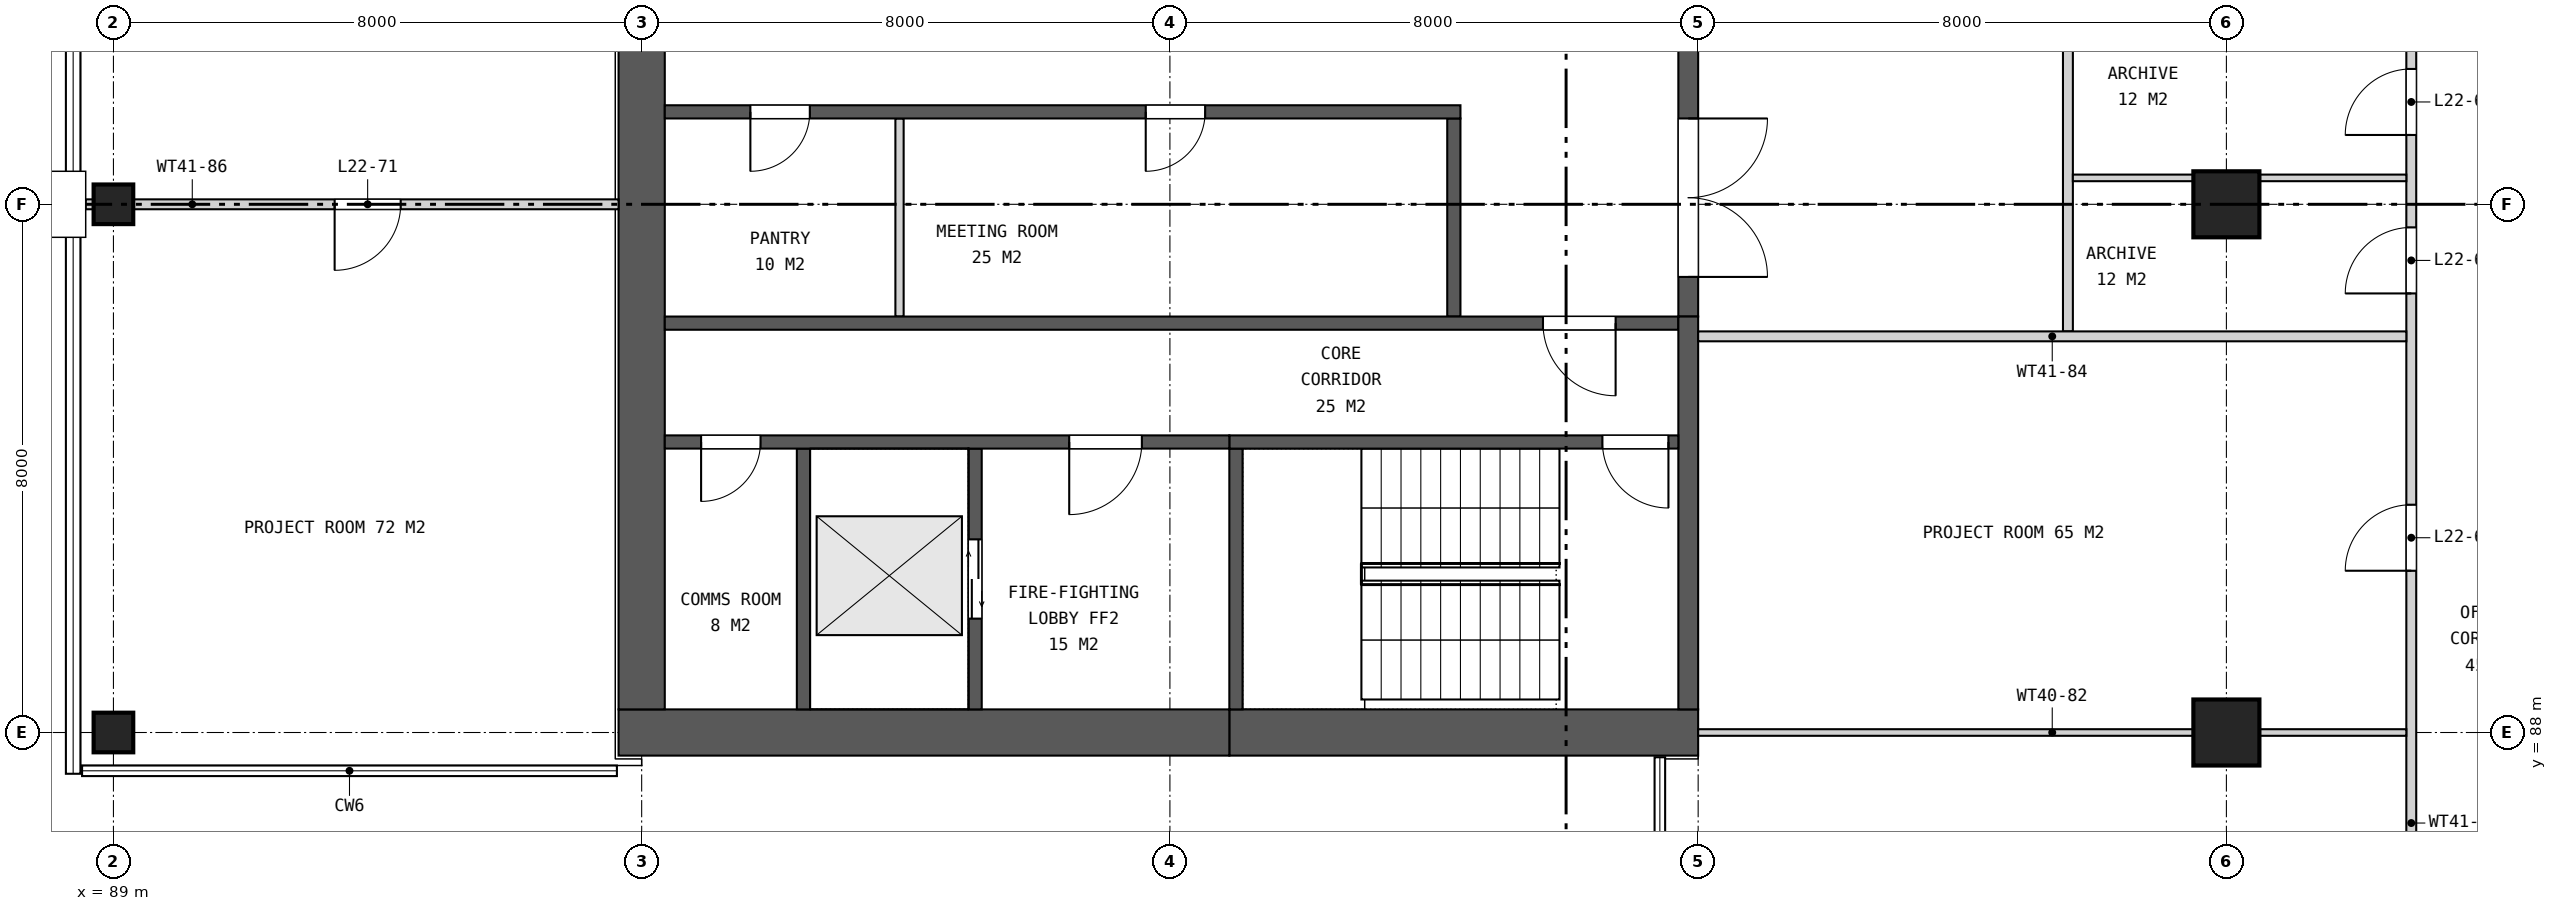
"""IFC4 building model, lengths in metres.
Left out: names, types, materials, properties, quantities, classifications, styles, units other than length and angle.
Written with IfcOpenShell. Run it as: python <this file> out.ifc"""

import sys

from ifc_helpers import new_model, si_unit, direction, frame, frame_2d, origin, origin_2d, place, context, subcontext, project, spatial, rectangle, extrude, element, fill, save


model = new_model("IFC4")
c1 = context("Model", 3, precision=1e-05, world=origin(), true_north=direction((0.0, 1.0)))
c2 = subcontext(c1, "Body", "Model", "MODEL_VIEW")
j1 = project(units=[si_unit("LENGTHUNIT", "METRE"), si_unit("PLANEANGLEUNIT", "RADIAN")], contexts=[c1])
p1 = place(None, origin())
s1 = spatial("IfcSite", under=j1, at=p1, CompositionType="ELEMENT")
p2 = place(p1, origin())
s2 = spatial("IfcBuilding", under=s1, at=p2, CompositionType="ELEMENT")
p3 = place(p2, frame((0.0, 0.0, 112.7)))
s3 = spatial("IfcBuildingStorey", under=s2, at=p3, CompositionType="ELEMENT", Elevation=112.7)
for number, where, z_axis, x_axis in (
    (1, (89.0, 88.0, 0.0), (0.0, 0.0, 1.0), (1.0, 0.0, 0.0)),
    (2, (89.0, 96.0, 0.0), (0.0, 0.0, 1.0), (1.0, 0.0, 0.0)),
):
    element("IfcColumn", number, at=place(p3, frame(where, z_axis=z_axis, x_axis=x_axis)), inside=s3, PredefinedType="COLUMN", context=c2, shape_type="SweptSolid", body=[
        extrude(rectangle(XDim=0.6, YDim=0.6, at=origin_2d()), origin(), (0.0, 0.0, 1.0), 4.2),
    ])
for number, where, z_axis, x_axis in (
    (3, (121.0, 88.0, 0.0), (0.0, 0.0, 1.0), (1.0, 0.0, 0.0)),
    (4, (121.0, 96.0, 0.0), (0.0, 0.0, 1.0), (1.0, 0.0, 0.0)),
):
    element("IfcColumn", number, at=place(p3, frame(where, z_axis=z_axis, x_axis=x_axis)), inside=s3, PredefinedType="COLUMN", context=c2, shape_type="SweptSolid", body=[
        extrude(rectangle(XDim=1.0, YDim=1.0, at=origin_2d()), origin(), (0.0, 0.0, 1.0), 4.2),
    ])
p4 = place(p3, frame((113.0, 88.0, 0.0), z_axis=(0.0, 0.0, 1.0), x_axis=(-1.0, 0.0, 0.0)))
e5 = element("IfcWall", 5, at=p4, inside=s3, PredefinedType="SHEAR", context=c2, shape_type="SweptSolid", body=[
    extrude(rectangle(XDim=7.1, YDim=0.7, at=frame_2d((3.55, 0.0))), origin(), (0.0, 0.0, 1.0), 4.2),
])
p5 = place(p3, frame((105.9, 88.0, 0.0), z_axis=(0.0, 0.0, 1.0), x_axis=(-1.0, 0.0, 0.0)))
e6 = element("IfcWall", 6, at=p5, inside=s3, PredefinedType="SHEAR", context=c2, shape_type="SweptSolid", body=[
    extrude(rectangle(XDim=9.25, YDim=0.7, at=frame_2d((4.625, 0.0))), origin(), (0.0, 0.0, 1.0), 4.2),
])
p6 = place(p3, frame((97.0, 111.65, 0.0), z_axis=(0.0, 0.0, 1.0), x_axis=(0.0, -1.0, 0.0)))
e7 = element("IfcWall", 7, at=p6, inside=s3, PredefinedType="SHEAR", context=c2, shape_type="SweptSolid", body=[
    extrude(rectangle(XDim=23.3, YDim=0.7, at=frame_2d((11.65, 0.0))), origin(), (0.0, 0.0, 1.0), 4.2),
])
p7 = place(p6, frame((10.45, 0.0, 0.0)))
e8 = element("IfcOpeningElement", 8, at=p7, cuts=e7, PredefinedType="OPENING", context=c2, shape_type="SweptSolid", body=[
    extrude(rectangle(XDim=2.4, YDim=2.4, at=frame_2d((1.2, 1.2))), frame((0.0, 0.36, 0.0), z_axis=(0.0, -1.0, 0.0), x_axis=(1.0, 0.0, 0.0)), (0.0, 0.0, 1.0), 0.72),
])
p8 = place(p3, frame((112.85, 105.7, 0.0), z_axis=(0.0, 0.0, 1.0), x_axis=(0.0, -1.0, 0.0)))
e9 = element("IfcWall", 9, at=p8, inside=s3, PredefinedType="SHEAR", context=c2, shape_type="SweptSolid", body=[
    extrude(rectangle(XDim=11.4, YDim=0.3, at=frame_2d((5.7, 0.0))), origin(), (0.0, 0.0, 1.0), 4.2),
])
p9 = place(p8, frame((0.6, 0.0, 0.0)))
e10 = element("IfcOpeningElement", 10, at=p9, cuts=e9, PredefinedType="OPENING", context=c2, shape_type="SweptSolid", body=[
    extrude(rectangle(XDim=2.4, YDim=2.4, at=frame_2d((1.2, 1.2))), frame((0.0, 0.16, 0.0), z_axis=(0.0, -1.0, 0.0), x_axis=(1.0, 0.0, 0.0)), (0.0, 0.0, 1.0), 0.32),
])
p10 = place(p8, frame((4.5, 0.0, 0.0)))
e11 = element("IfcOpeningElement", 11, at=p10, cuts=e9, PredefinedType="OPENING", context=c2, shape_type="SweptSolid", body=[
    extrude(rectangle(XDim=2.4, YDim=2.4, at=frame_2d((1.2, 1.2))), frame((0.0, 0.16, 0.0), z_axis=(0.0, -1.0, 0.0), x_axis=(1.0, 0.0, 0.0)), (0.0, 0.0, 1.0), 0.32),
])
p11 = place(p8, frame((8.4, 0.0, 0.0)))
e12 = element("IfcOpeningElement", 12, at=p11, cuts=e9, PredefinedType="OPENING", context=c2, shape_type="SweptSolid", body=[
    extrude(rectangle(XDim=2.4, YDim=2.4, at=frame_2d((1.2, 1.2))), frame((0.0, 0.16, 0.0), z_axis=(0.0, -1.0, 0.0), x_axis=(1.0, 0.0, 0.0)), (0.0, 0.0, 1.0), 0.32),
])
p12 = place(p3, frame((109.3, 97.3, 0.0), z_axis=(0.0, 0.0, 1.0), x_axis=(0.0, -1.0, 0.0)))
e13 = element("IfcWall", 13, at=p12, inside=s3, PredefinedType="SHEAR", context=c2, shape_type="SweptSolid", body=[
    extrude(rectangle(XDim=3.0, YDim=0.2, at=frame_2d((1.5, 0.0))), origin(), (0.0, 0.0, 1.0), 4.2),
])
p13 = place(p3, frame((100.905, 97.3, 0.0), z_axis=(0.0, 0.0, 1.0), x_axis=(0.0, -1.0, 0.0)))
e14 = element("IfcWall", 14, at=p13, inside=s3, PredefinedType="PARTITIONING", context=c2, shape_type="SweptSolid", body=[
    extrude(rectangle(XDim=3.0, YDim=0.125, at=frame_2d((1.5, 0.0))), origin(), (0.0, 0.0, 1.0), 4.2),
])
p14 = place(p3, frame((109.4, 97.4, 0.0), z_axis=(0.0, 0.0, 1.0), x_axis=(-1.0, 0.0, 0.0)))
e15 = element("IfcWall", 15, at=p14, inside=s3, PredefinedType="SHEAR", context=c2, shape_type="SweptSolid", body=[
    extrude(rectangle(XDim=12.05, YDim=0.2, at=frame_2d((6.025, 0.0))), origin(), (0.0, 0.0, 1.0), 4.2),
])
p15 = place(p14, frame((3.866, 0.0, 0.0)))
e16 = element("IfcOpeningElement", 16, at=p15, cuts=e15, PredefinedType="OPENING", context=c2, shape_type="SweptSolid", body=[
    extrude(rectangle(XDim=0.9, YDim=2.1, at=frame_2d((0.45, 1.05))), frame((0.0, 0.11, 0.0), z_axis=(0.0, -1.0, 0.0), x_axis=(1.0, 0.0, 0.0)), (0.0, 0.0, 1.0), 0.22),
])
p16 = place(p14, frame((9.854, 0.0, 0.0)))
e17 = element("IfcOpeningElement", 17, at=p16, cuts=e15, PredefinedType="OPENING", context=c2, shape_type="SweptSolid", body=[
    extrude(rectangle(XDim=0.9, YDim=2.1, at=frame_2d((0.45, 1.05))), frame((0.0, 0.11, 0.0), z_axis=(0.0, -1.0, 0.0), x_axis=(1.0, 0.0, 0.0)), (0.0, 0.0, 1.0), 0.22),
])
p17 = place(p3, frame((112.7, 94.2, 0.0), z_axis=(0.0, 0.0, 1.0), x_axis=(-1.0, 0.0, 0.0)))
e18 = element("IfcWall", 18, at=p17, inside=s3, PredefinedType="SHEAR", context=c2, shape_type="SweptSolid", body=[
    extrude(rectangle(XDim=15.35, YDim=0.2, at=frame_2d((7.675, 0.0))), origin(), (0.0, 0.0, 1.0), 4.2),
])
p18 = place(p17, frame((0.95, 0.0, 0.0)))
e19 = element("IfcOpeningElement", 19, at=p18, cuts=e18, PredefinedType="OPENING", context=c2, shape_type="SweptSolid", body=[
    extrude(rectangle(XDim=1.1, YDim=2.1, at=frame_2d((0.55, 1.05))), frame((0.0, 0.11, 0.0), z_axis=(0.0, -1.0, 0.0), x_axis=(1.0, 0.0, 0.0)), (0.0, 0.0, 1.0), 0.22),
])
p19 = place(p3, frame((112.85, 94.3, 0.0), z_axis=(0.0, 0.0, 1.0), x_axis=(0.0, -1.0, 0.0)))
e20 = element("IfcWall", 20, at=p19, inside=s3, PredefinedType="SHEAR", context=c2, shape_type="SweptSolid", body=[
    extrude(rectangle(XDim=5.95, YDim=0.3, at=frame_2d((2.975, 0.0))), origin(), (0.0, 0.0, 1.0), 4.2),
])
p20 = place(p3, frame((106.0, 92.3, 0.0), z_axis=(0.0, 0.0, 1.0), x_axis=(0.0, -1.0, 0.0)))
e21 = element("IfcWall", 21, at=p20, inside=s3, PredefinedType="SHEAR", context=c2, shape_type="SweptSolid", body=[
    extrude(rectangle(XDim=3.95, YDim=0.2, at=frame_2d((1.975, 0.0))), origin(), (0.0, 0.0, 1.0), 4.2),
])
p21 = place(p3, frame((102.05, 92.3, 0.0), z_axis=(0.0, 0.0, 1.0), x_axis=(0.0, -1.0, 0.0)))
e22 = element("IfcWall", 22, at=p21, inside=s3, PredefinedType="SHEAR", context=c2, shape_type="SweptSolid", body=[
    extrude(rectangle(XDim=3.95, YDim=0.2, at=frame_2d((1.975, 0.0))), origin(), (0.0, 0.0, 1.0), 4.2),
])
p22 = place(p21, frame((1.375, 0.0, 0.0)))
e23 = element("IfcOpeningElement", 23, at=p22, cuts=e22, PredefinedType="OPENING", context=c2, shape_type="SweptSolid", body=[
    extrude(rectangle(XDim=1.2, YDim=2.1, at=frame_2d((0.6, 1.05))), frame((0.0, 0.11, 0.0), z_axis=(0.0, -1.0, 0.0), x_axis=(1.0, 0.0, 0.0)), (0.0, 0.0, 1.0), 0.22),
])
p23 = place(p3, frame((99.45, 92.3, 0.0), z_axis=(0.0, 0.0, 1.0), x_axis=(0.0, -1.0, 0.0)))
e24 = element("IfcWall", 24, at=p23, inside=s3, PredefinedType="SHEAR", context=c2, shape_type="SweptSolid", body=[
    extrude(rectangle(XDim=3.95, YDim=0.2, at=frame_2d((1.975, 0.0))), origin(), (0.0, 0.0, 1.0), 4.2),
])
p24 = place(p3, frame((112.7, 92.4, 0.0), z_axis=(0.0, 0.0, 1.0), x_axis=(-1.0, 0.0, 0.0)))
e25 = element("IfcWall", 25, at=p24, inside=s3, PredefinedType="SHEAR", context=c2, shape_type="SweptSolid", body=[
    extrude(rectangle(XDim=6.8, YDim=0.2, at=frame_2d((3.4, 0.0))), origin(), (0.0, 0.0, 1.0), 4.2),
])
p25 = place(p24, frame((0.15, 0.0, 0.0)))
e26 = element("IfcOpeningElement", 26, at=p25, cuts=e25, PredefinedType="OPENING", context=c2, shape_type="SweptSolid", body=[
    extrude(rectangle(XDim=1.0, YDim=2.1, at=frame_2d((0.5, 1.05))), frame((0.0, 0.11, 0.0), z_axis=(0.0, -1.0, 0.0), x_axis=(1.0, 0.0, 0.0)), (0.0, 0.0, 1.0), 0.22),
])
p26 = place(p3, frame((105.9, 92.4, 0.0), z_axis=(0.0, 0.0, 1.0), x_axis=(-1.0, 0.0, 0.0)))
e27 = element("IfcWall", 27, at=p26, inside=s3, PredefinedType="SHEAR", context=c2, shape_type="SweptSolid", body=[
    extrude(rectangle(XDim=8.55, YDim=0.2, at=frame_2d((4.275, 0.0))), origin(), (0.0, 0.0, 1.0), 4.2),
])
p27 = place(p26, frame((1.325, 0.0, 0.0)))
e28 = element("IfcOpeningElement", 28, at=p27, cuts=e27, PredefinedType="OPENING", context=c2, shape_type="SweptSolid", body=[
    extrude(rectangle(XDim=1.1, YDim=2.1, at=frame_2d((0.55, 1.05))), frame((0.0, 0.11, 0.0), z_axis=(0.0, -1.0, 0.0), x_axis=(1.0, 0.0, 0.0)), (0.0, 0.0, 1.0), 0.22),
])
p28 = place(p26, frame((7.1, 0.0, 0.0)))
e29 = element("IfcOpeningElement", 29, at=p28, cuts=e27, PredefinedType="OPENING", context=c2, shape_type="SweptSolid", body=[
    extrude(rectangle(XDim=0.9, YDim=2.1, at=frame_2d((0.45, 1.05))), frame((0.0, 0.11, 0.0), z_axis=(0.0, -1.0, 0.0), x_axis=(1.0, 0.0, 0.0)), (0.0, 0.0, 1.0), 0.22),
])
p29 = place(p3, frame((118.6, 94.075, 0.0), z_axis=(0.0, 0.0, 1.0), x_axis=(0.0, 1.0, 0.0)))
e30 = element("IfcWall", 30, at=p29, inside=s3, PredefinedType="PARTITIONING", context=c2, shape_type="SweptSolid", body=[
    extrude(rectangle(XDim=4.725, YDim=0.15, at=frame_2d((2.363, 0.0))), origin(), (0.0, 0.0, 1.0), 3.437),
])
p30 = place(p3, frame((123.8, 80.075, 0.0), z_axis=(0.0, 0.0, 1.0), x_axis=(0.0, 1.0, 0.0)))
e31 = element("IfcWall", 31, at=p30, inside=s3, PredefinedType="PARTITIONING", context=c2, shape_type="SweptSolid", body=[
    extrude(rectangle(XDim=18.725, YDim=0.15, at=frame_2d((9.363, 0.0))), origin(), (0.0, 0.0, 1.0), 3.437),
])
p31 = place(p30, frame((16.975, 0.0, 0.0)))
e32 = element("IfcOpeningElement", 32, at=p31, cuts=e31, PredefinedType="OPENING", context=c2, shape_type="SweptSolid", body=[
    extrude(rectangle(XDim=1.0, YDim=2.1, at=frame_2d((0.5, 1.05))), frame((0.0, 0.085, 0.0), z_axis=(0.0, -1.0, 0.0), x_axis=(1.0, 0.0, 0.0)), (0.0, 0.0, 1.0), 0.17),
])
p32 = place(p30, frame((14.575, 0.0, 0.0)))
e33 = element("IfcOpeningElement", 33, at=p32, cuts=e31, PredefinedType="OPENING", context=c2, shape_type="SweptSolid", body=[
    extrude(rectangle(XDim=1.0, YDim=2.1, at=frame_2d((0.5, 1.05))), frame((0.0, 0.085, 0.0), z_axis=(0.0, -1.0, 0.0), x_axis=(1.0, 0.0, 0.0)), (0.0, 0.0, 1.0), 0.17),
])
p33 = place(p30, frame((10.375, 0.0, 0.0)))
e34 = element("IfcOpeningElement", 34, at=p33, cuts=e31, PredefinedType="OPENING", context=c2, shape_type="SweptSolid", body=[
    extrude(rectangle(XDim=1.0, YDim=2.1, at=frame_2d((0.5, 1.05))), frame((0.0, 0.085, 0.0), z_axis=(0.0, -1.0, 0.0), x_axis=(1.0, 0.0, 0.0)), (0.0, 0.0, 1.0), 0.17),
])
p34 = place(p30, frame((3.45, 0.0, 0.0)))
e35 = element("IfcOpeningElement", 35, at=p34, cuts=e31, PredefinedType="OPENING", context=c2, shape_type="SweptSolid", body=[
    extrude(rectangle(XDim=1.0, YDim=2.1, at=frame_2d((0.5, 1.05))), frame((0.0, 0.085, 0.0), z_axis=(0.0, -1.0, 0.0), x_axis=(1.0, 0.0, 0.0)), (0.0, 0.0, 1.0), 0.17),
])
p35 = place(p3, frame((113.0, 88.0, 0.0), z_axis=(0.0, 0.0, 1.0), x_axis=(1.0, 0.0, 0.0)))
e36 = element("IfcWall", 36, at=p35, inside=s3, PredefinedType="PARTITIONING", context=c2, shape_type="SweptSolid", body=[
    extrude(rectangle(XDim=10.725, YDim=0.1, at=frame_2d((5.363, 0.0))), origin(), (0.0, 0.0, 1.0), 3.437),
])
p36 = place(p3, frame((113.0, 94.0, 0.0), z_axis=(0.0, 0.0, 1.0), x_axis=(1.0, 0.0, 0.0)))
e37 = element("IfcWall", 37, at=p36, inside=s3, PredefinedType="PARTITIONING", context=c2, shape_type="SweptSolid", body=[
    extrude(rectangle(XDim=10.725, YDim=0.15, at=frame_2d((5.363, 0.0))), origin(), (0.0, 0.0, 1.0), 3.437),
])
p37 = place(p3, frame((88.58, 96.0, 0.0), z_axis=(0.0, 0.0, 1.0), x_axis=(1.0, 0.0, 0.0)))
e38 = element("IfcWall", 38, at=p37, inside=s3, PredefinedType="PARTITIONING", context=c2, shape_type="SweptSolid", body=[
    extrude(rectangle(XDim=8.07, YDim=0.15, at=frame_2d((4.035, 0.0))), origin(), (0.0, 0.0, 1.0), 3.437),
])
p38 = place(p37, frame((3.77, 0.0, 0.0)))
e39 = element("IfcOpeningElement", 39, at=p38, cuts=e38, PredefinedType="OPENING", context=c2, shape_type="SweptSolid", body=[
    extrude(rectangle(XDim=1.0, YDim=2.1, at=frame_2d((0.5, 1.05))), frame((0.0, 0.085, 0.0), z_axis=(0.0, -1.0, 0.0), x_axis=(1.0, 0.0, 0.0)), (0.0, 0.0, 1.0), 0.17),
])
p39 = place(p3, frame((118.675, 96.4, 0.0), z_axis=(0.0, 0.0, 1.0), x_axis=(1.0, 0.0, 0.0)))
e40 = element("IfcWall", 40, at=p39, inside=s3, PredefinedType="PARTITIONING", context=c2, shape_type="SweptSolid", body=[
    extrude(rectangle(XDim=5.05, YDim=0.1, at=frame_2d((2.525, 0.0))), origin(), (0.0, 0.0, 1.0), 3.437),
])
p40 = place(p11, origin())
e41 = element("IfcDoor", 41, at=p40, inside=s3, OperationType="DOUBLE_DOOR_SINGLE_SWING", PredefinedType="DOOR", context=c2, shape_type="SweptSolid", body=[
    extrude(rectangle(XDim=2.4, YDim=2.4, at=frame_2d((1.2, 1.2))), frame((0.0, 0.025, 0.0), z_axis=(0.0, -1.0, 0.0), x_axis=(1.0, 0.0, 0.0)), (0.0, 0.0, 1.0), 0.05),
])
fill(e12, e41)
p41 = place(p15, origin())
e42 = element("IfcDoor", 42, at=p41, inside=s3, OperationType="SINGLE_SWING_RIGHT", PredefinedType="DOOR", context=c2, shape_type="SweptSolid", body=[
    extrude(rectangle(XDim=0.9, YDim=2.1, at=frame_2d((0.45, 1.05))), frame((0.0, 0.025, 0.0), z_axis=(0.0, -1.0, 0.0), x_axis=(1.0, 0.0, 0.0)), (0.0, 0.0, 1.0), 0.05),
])
fill(e16, e42)
p42 = place(p16, origin())
e43 = element("IfcDoor", 43, at=p42, inside=s3, OperationType="SINGLE_SWING_RIGHT", PredefinedType="DOOR", context=c2, shape_type="SweptSolid", body=[
    extrude(rectangle(XDim=0.9, YDim=2.1, at=frame_2d((0.45, 1.05))), frame((0.0, 0.025, 0.0), z_axis=(0.0, -1.0, 0.0), x_axis=(1.0, 0.0, 0.0)), (0.0, 0.0, 1.0), 0.05),
])
fill(e17, e43)
p43 = place(p18, origin())
e44 = element("IfcDoor", 44, at=p43, inside=s3, OperationType="SINGLE_SWING_LEFT", PredefinedType="DOOR", context=c2, shape_type="SweptSolid", body=[
    extrude(rectangle(XDim=1.1, YDim=2.1, at=frame_2d((0.55, 1.05))), frame((0.0, 0.025, 0.0), z_axis=(0.0, -1.0, 0.0), x_axis=(1.0, 0.0, 0.0)), (0.0, 0.0, 1.0), 0.05),
])
fill(e19, e44)
p44 = place(p22, origin())
e45 = element("IfcDoor", 45, at=p44, inside=s3, OperationType="DOUBLE_DOOR_SLIDING", PredefinedType="DOOR", context=c2, shape_type="SweptSolid", body=[
    extrude(rectangle(XDim=1.2, YDim=2.1, at=frame_2d((0.6, 1.05))), frame((0.0, 0.025, 0.0), z_axis=(0.0, -1.0, 0.0), x_axis=(1.0, 0.0, 0.0)), (0.0, 0.0, 1.0), 0.05),
])
fill(e23, e45)
p45 = place(p25, origin())
e46 = element("IfcDoor", 46, at=p45, inside=s3, OperationType="SINGLE_SWING_LEFT", PredefinedType="DOOR", context=c2, shape_type="SweptSolid", body=[
    extrude(rectangle(XDim=1.0, YDim=2.1, at=frame_2d((0.5, 1.05))), frame((0.0, 0.025, 0.0), z_axis=(0.0, -1.0, 0.0), x_axis=(1.0, 0.0, 0.0)), (0.0, 0.0, 1.0), 0.05),
])
fill(e26, e46)
p46 = place(p27, origin())
e47 = element("IfcDoor", 47, at=p46, inside=s3, OperationType="SINGLE_SWING_RIGHT", PredefinedType="DOOR", context=c2, shape_type="SweptSolid", body=[
    extrude(rectangle(XDim=1.1, YDim=2.1, at=frame_2d((0.55, 1.05))), frame((0.0, 0.025, 0.0), z_axis=(0.0, -1.0, 0.0), x_axis=(1.0, 0.0, 0.0)), (0.0, 0.0, 1.0), 0.05),
])
fill(e28, e47)
p47 = place(p28, origin())
e48 = element("IfcDoor", 48, at=p47, inside=s3, OperationType="SINGLE_SWING_RIGHT", PredefinedType="DOOR", context=c2, shape_type="SweptSolid", body=[
    extrude(rectangle(XDim=0.9, YDim=2.1, at=frame_2d((0.45, 1.05))), frame((0.0, 0.025, 0.0), z_axis=(0.0, -1.0, 0.0), x_axis=(1.0, 0.0, 0.0)), (0.0, 0.0, 1.0), 0.05),
])
fill(e29, e48)
p48 = place(p31, origin())
e49 = element("IfcDoor", 49, at=p48, inside=s3, OperationType="SINGLE_SWING_LEFT", PredefinedType="DOOR", context=c2, shape_type="SweptSolid", body=[
    extrude(rectangle(XDim=1.0, YDim=2.1, at=frame_2d((0.5, 1.05))), frame((0.0, 0.025, 0.0), z_axis=(0.0, -1.0, 0.0), x_axis=(1.0, 0.0, 0.0)), (0.0, 0.0, 1.0), 0.05),
])
fill(e32, e49)
p49 = place(p32, origin())
e50 = element("IfcDoor", 50, at=p49, inside=s3, OperationType="SINGLE_SWING_LEFT", PredefinedType="DOOR", context=c2, shape_type="SweptSolid", body=[
    extrude(rectangle(XDim=1.0, YDim=2.1, at=frame_2d((0.5, 1.05))), frame((0.0, 0.025, 0.0), z_axis=(0.0, -1.0, 0.0), x_axis=(1.0, 0.0, 0.0)), (0.0, 0.0, 1.0), 0.05),
])
fill(e33, e50)
p50 = place(p33, origin())
e51 = element("IfcDoor", 51, at=p50, inside=s3, OperationType="SINGLE_SWING_LEFT", PredefinedType="DOOR", context=c2, shape_type="SweptSolid", body=[
    extrude(rectangle(XDim=1.0, YDim=2.1, at=frame_2d((0.5, 1.05))), frame((0.0, 0.025, 0.0), z_axis=(0.0, -1.0, 0.0), x_axis=(1.0, 0.0, 0.0)), (0.0, 0.0, 1.0), 0.05),
])
fill(e34, e51)
p51 = place(p38, frame((1.0, 0.0, 0.0), z_axis=(0.0, 0.0, 1.0), x_axis=(-1.0, 0.0, 0.0)))
e52 = element("IfcDoor", 52, at=p51, inside=s3, OperationType="SINGLE_SWING_RIGHT", PredefinedType="DOOR", context=c2, shape_type="SweptSolid", body=[
    extrude(rectangle(XDim=1.0, YDim=2.1, at=frame_2d((0.5, 1.05))), frame((0.0, 0.025, 0.0), z_axis=(0.0, -1.0, 0.0), x_axis=(1.0, 0.0, 0.0)), (0.0, 0.0, 1.0), 0.05),
])
fill(e39, e52)
save(model, sys.argv[1])
